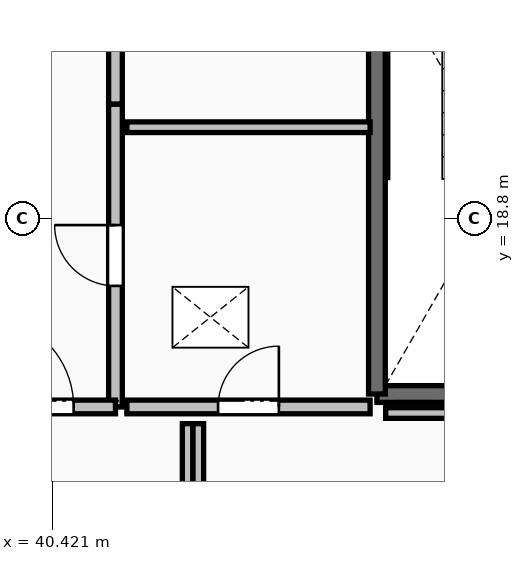
"""IFC4 building model, lengths in metres.
Left out: names, types, materials, properties, quantities, classifications, styles, units other than length and angle.
Written with IfcOpenShell. Run it as: python <this file> out.ifc"""

import sys

from ifc_helpers import new_model, si_unit, direction, frame, frame_2d, origin, place, context, subcontext, project, spatial, rectangle, extrude, element, fill, save


model = new_model("IFC4")
c1 = context("Model", 3, precision=1e-05, world=origin(), true_north=direction((0.0, 1.0)))
c2 = subcontext(c1, "Body", "Model", "MODEL_VIEW")
j1 = project(units=[si_unit("LENGTHUNIT", "METRE"), si_unit("PLANEANGLEUNIT", "RADIAN")], contexts=[c1])
p1 = place(None, origin())
s1 = spatial("IfcSite", under=j1, at=p1, CompositionType="ELEMENT")
p2 = place(p1, origin())
s2 = spatial("IfcBuilding", under=s1, at=p2, CompositionType="ELEMENT")
p3 = place(p2, frame((0.0, 0.0, 214.3)))
s3 = spatial("IfcBuildingStorey", under=s2, at=p3, CompositionType="ELEMENT", Elevation=214.3)
p4 = place(p3, frame((48.06, 16.49, 0.0), z_axis=(0.0, 0.0, 1.0), x_axis=(-1.0, 0.0, 0.0)))
e1 = element("IfcWall", 1, at=p4, inside=s3, PredefinedType="SOLIDWALL", context=c2, shape_type="SweptSolid", body=[
    extrude(rectangle(XDim=3.37, YDim=0.22, at=frame_2d((1.685, 0.0))), origin(), (0.0, 0.0, 1.0), 3.29),
])
p5 = place(p3, frame((44.69, 16.49, 0.0), z_axis=(0.0, 0.0, 1.0), x_axis=(0.0, 1.0, 0.0)))
e2 = element("IfcWall", 2, at=p5, inside=s3, PredefinedType="SOLIDWALL", context=c2, shape_type="SweptSolid", body=[
    extrude(rectangle(XDim=7.42, YDim=0.22, at=frame_2d((3.71, 0.0))), origin(), (0.0, 0.0, 1.0), 3.29),
])
p6 = place(p3, frame((41.25, 16.32, 0.0), z_axis=(0.0, 0.0, 1.0), x_axis=(0.0, 1.0, 0.0)))
e3 = element("IfcWall", 3, at=p6, inside=s3, PredefinedType="PARTITIONING", context=c2, shape_type="SweptSolid", body=[
    extrude(rectangle(XDim=3.985, YDim=0.18, at=frame_2d((1.992, 0.0))), origin(), (0.0, 0.0, 1.0), 3.29),
])
p7 = place(p6, frame((1.593, 0.0, 0.0)))
e4 = element("IfcOpeningElement", 4, at=p7, cuts=e3, PredefinedType="OPENING", context=c2, shape_type="SweptSolid", body=[
    extrude(rectangle(XDim=0.8, YDim=2.05, at=frame_2d((0.4, 1.025))), frame((0.0, 0.105, 0.0), z_axis=(0.0, -1.0, 0.0), x_axis=(1.0, 0.0, 0.0)), (0.0, 0.0, 1.0), 0.21),
])
p8 = place(p3, frame((41.25, 20.305, 0.0), z_axis=(0.0, 0.0, 1.0), x_axis=(0.0, 1.0, 0.0)))
e5 = element("IfcWall", 5, at=p8, inside=s3, PredefinedType="PARTITIONING", context=c2, shape_type="SweptSolid", body=[
    extrude(rectangle(XDim=3.895, YDim=0.18, at=frame_2d((1.948, 0.0))), origin(), (0.0, 0.0, 1.0), 3.29),
])
p9 = place(p8, frame((1.448, 0.0, 0.0)))
e6 = element("IfcOpeningElement", 6, at=p9, cuts=e5, PredefinedType="OPENING", context=c2, shape_type="SweptSolid", body=[
    extrude(rectangle(XDim=1.0, YDim=2.15, at=frame_2d((0.5, 1.075))), frame((0.0, 0.105, 0.0), z_axis=(0.0, -1.0, 0.0), x_axis=(1.0, 0.0, 0.0)), (0.0, 0.0, 1.0), 0.21),
])
p10 = place(p3, frame((38.95, 16.32, 0.0), z_axis=(0.0, 0.0, 1.0), x_axis=(1.0, 0.0, 0.0)))
e7 = element("IfcWall", 7, at=p10, inside=s3, PredefinedType="PARTITIONING", context=c2, shape_type="SweptSolid", body=[
    extrude(rectangle(XDim=2.3, YDim=0.18, at=frame_2d((1.15, 0.0))), origin(), (0.0, 0.0, 1.0), 3.29),
])
p11 = place(p10, frame((0.55, 0.0, 0.0)))
e8 = element("IfcOpeningElement", 8, at=p11, cuts=e7, PredefinedType="OPENING", context=c2, shape_type="SweptSolid", body=[
    extrude(rectangle(XDim=1.2, YDim=2.15, at=frame_2d((0.6, 1.075))), frame((0.0, 0.105, 0.0), z_axis=(0.0, -1.0, 0.0), x_axis=(1.0, 0.0, 0.0)), (0.0, 0.0, 1.0), 0.21),
])
p12 = place(p3, frame((44.6, 20.0, 0.0), z_axis=(0.0, 0.0, 1.0), x_axis=(-1.0, 0.0, 0.0)))
e9 = element("IfcWall", 9, at=p12, inside=s3, PredefinedType="PARTITIONING", context=c2, shape_type="SweptSolid", body=[
    extrude(rectangle(XDim=3.2, YDim=0.14, at=frame_2d((1.6, 0.0))), origin(), (0.0, 0.0, 1.0), 3.29),
])
p13 = place(p3, frame((41.4, 16.32, 0.0), z_axis=(0.0, 0.0, 1.0), x_axis=(1.0, 0.0, 0.0)))
e10 = element("IfcWall", 10, at=p13, inside=s3, PredefinedType="PARTITIONING", context=c2, shape_type="SweptSolid", body=[
    extrude(rectangle(XDim=3.2, YDim=0.18, at=frame_2d((1.6, 0.0))), origin(), (0.0, 0.0, 1.0), 3.29),
])
p14 = place(p13, frame((1.2, 0.0, 0.0)))
e11 = element("IfcOpeningElement", 11, at=p14, cuts=e10, PredefinedType="OPENING", context=c2, shape_type="SweptSolid", body=[
    extrude(rectangle(XDim=0.8, YDim=2.05, at=frame_2d((0.4, 1.025))), frame((0.0, 0.105, 0.0), z_axis=(0.0, -1.0, 0.0), x_axis=(1.0, 0.0, 0.0)), (0.0, 0.0, 1.0), 0.21),
])
for number, where, z_axis, x_axis in (
    (12, (42.2, 16.1, 0.0), (0.0, 0.0, 1.0), (0.0, -1.0, 0.0)),
    (13, (42.34, 14.27, 0.0), (0.0, 0.0, 1.0), (0.0, 1.0, 0.0)),
):
    element("IfcWall", number, at=place(p3, frame(where, z_axis=z_axis, x_axis=x_axis)), inside=s3, PredefinedType="PARTITIONING", context=c2, shape_type="SweptSolid", body=[
        extrude(rectangle(XDim=1.83, YDim=0.14, at=frame_2d((0.915, 0.0))), origin(), (0.0, 0.0, 1.0), 2.979),
    ])
p15 = place(p3, frame((44.805, 16.24, 0.0), z_axis=(0.0, 0.0, 1.0), x_axis=(1.0, 0.0, 0.0)))
e14 = element("IfcWall", 14, at=p15, inside=s3, PredefinedType="PARTITIONING", context=c2, shape_type="SweptSolid", body=[
    extrude(rectangle(XDim=3.745, YDim=0.14, at=frame_2d((1.873, 0.0))), origin(), (0.0, 0.0, 1.0), 2.482),
])
p16 = place(p7, origin())
e15 = element("IfcDoor", 15, at=p16, inside=s3, OperationType="SINGLE_SWING_RIGHT", PredefinedType="DOOR", context=c2, shape_type="SweptSolid", body=[
    extrude(rectangle(XDim=0.8, YDim=2.05, at=frame_2d((0.4, 1.025))), frame((0.0, 0.025, 0.0), z_axis=(0.0, -1.0, 0.0), x_axis=(1.0, 0.0, 0.0)), (0.0, 0.0, 1.0), 0.05),
])
fill(e4, e15)
p17 = place(p11, origin())
e16 = element("IfcDoor", 16, at=p17, inside=s3, OperationType="SINGLE_SWING_LEFT", PredefinedType="DOOR", context=c2, shape_type="SweptSolid", body=[
    extrude(rectangle(XDim=1.2, YDim=2.15, at=frame_2d((0.6, 1.075))), frame((0.0, 0.025, 0.0), z_axis=(0.0, -1.0, 0.0), x_axis=(1.0, 0.0, 0.0)), (0.0, 0.0, 1.0), 0.05),
])
fill(e8, e16)
p18 = place(p14, origin())
e17 = element("IfcDoor", 17, at=p18, inside=s3, OperationType="SINGLE_SWING_RIGHT", PredefinedType="DOOR", context=c2, shape_type="SweptSolid", body=[
    extrude(rectangle(XDim=0.8, YDim=2.05, at=frame_2d((0.4, 1.025))), frame((0.0, 0.025, 0.0), z_axis=(0.0, -1.0, 0.0), x_axis=(1.0, 0.0, 0.0)), (0.0, 0.0, 1.0), 0.05),
])
fill(e11, e17)
save(model, sys.argv[1])
